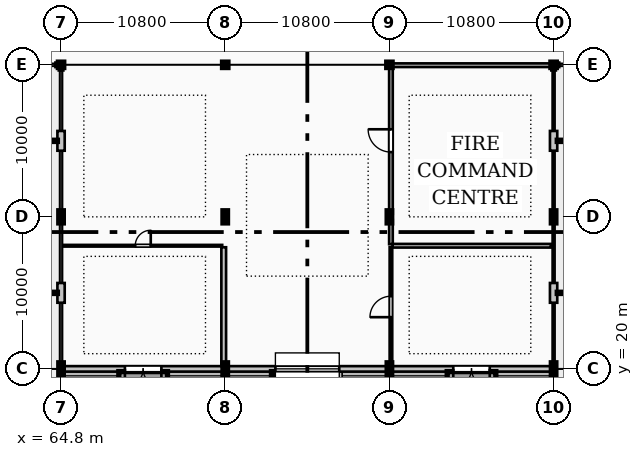
"""IFC4 building model, lengths in metres.
Left out: names, types, materials, properties, quantities, classifications, styles, units other than length and angle.
Written with IfcOpenShell. Run it as: python <this file> out.ifc"""

import sys

from ifc_helpers import new_model, si_unit, direction, frame, frame_2d, origin, origin_2d, place, context, subcontext, project, spatial, rectangle, hollow_circle, i_section, extrude, element, fill, save


model = new_model("IFC4")
c1 = context("Model", 3, precision=1e-05, world=origin(), true_north=direction((0.0, 1.0)))
c2 = subcontext(c1, "Body", "Model", "MODEL_VIEW")
j1 = project(units=[si_unit("LENGTHUNIT", "METRE"), si_unit("PLANEANGLEUNIT", "RADIAN")], contexts=[c1])
p1 = place(None, origin())
s1 = spatial("IfcSite", under=j1, at=p1, CompositionType="ELEMENT")
p2 = place(p1, origin())
s2 = spatial("IfcBuilding", under=s1, at=p2, CompositionType="ELEMENT")
p3 = place(p2, origin())
s3 = spatial("IfcBuildingStorey", under=s2, at=p3, CompositionType="ELEMENT", Elevation=0.0)
for number, where, z_axis, x_axis in (
    (1, (64.8, 20.0, 0.0), (0.0, 0.0, 1.0), (1.0, 0.0, 0.0)),
    (2, (64.8, 30.0, 0.0), (0.0, 0.0, 1.0), (1.0, 0.0, 0.0)),
):
    element("IfcColumn", number, at=place(p3, frame(where, z_axis=z_axis, x_axis=x_axis)), inside=s3, PredefinedType="COLUMN", context=c2, shape_type="SweptSolid", body=[
        extrude(i_section(OverallWidth=0.3, OverallDepth=0.8, WebThickness=0.018, FlangeThickness=0.033, FilletRadius=0.03, at=origin_2d()), origin(), (0.0, 0.0, 1.0), 4.8),
    ])
p4 = place(p3, frame((64.8, 40.0, 0.0), z_axis=(0.0, 0.0, 1.0), x_axis=(1.0, 0.0, 0.0)))
e3 = element("IfcColumn", 3, at=p4, inside=s3, PredefinedType="COLUMN", context=c2, shape_type="SweptSolid", body=[
    extrude(hollow_circle(Radius=0.178, WallThickness=0.016, at=origin_2d()), origin(), (0.0, 0.0, 1.0), 4.8),
])
for number, where, z_axis, x_axis in (
    (4, (75.6, 20.0, 0.0), (0.0, 0.0, 1.0), (1.0, 0.0, 0.0)),
    (5, (75.6, 30.0, 0.0), (0.0, 0.0, 1.0), (1.0, 0.0, 0.0)),
):
    element("IfcColumn", number, at=place(p3, frame(where, z_axis=z_axis, x_axis=x_axis)), inside=s3, PredefinedType="COLUMN", context=c2, shape_type="SweptSolid", body=[
        extrude(i_section(OverallWidth=0.3, OverallDepth=0.8, WebThickness=0.018, FlangeThickness=0.033, FilletRadius=0.03, at=origin_2d()), origin(), (0.0, 0.0, 1.0), 4.8),
    ])
p5 = place(p3, frame((75.6, 40.0, 0.0), z_axis=(0.0, 0.0, 1.0), x_axis=(1.0, 0.0, 0.0)))
e6 = element("IfcColumn", 6, at=p5, inside=s3, PredefinedType="COLUMN", context=c2, shape_type="SweptSolid", body=[
    extrude(hollow_circle(Radius=0.178, WallThickness=0.016, at=origin_2d()), origin(), (0.0, 0.0, 1.0), 4.8),
])
for number, where, z_axis, x_axis in (
    (7, (86.4, 20.0, 0.0), (0.0, 0.0, 1.0), (1.0, 0.0, 0.0)),
    (8, (86.4, 30.0, 0.0), (0.0, 0.0, 1.0), (1.0, 0.0, 0.0)),
):
    element("IfcColumn", number, at=place(p3, frame(where, z_axis=z_axis, x_axis=x_axis)), inside=s3, PredefinedType="COLUMN", context=c2, shape_type="SweptSolid", body=[
        extrude(i_section(OverallWidth=0.3, OverallDepth=0.8, WebThickness=0.018, FlangeThickness=0.033, FilletRadius=0.03, at=origin_2d()), origin(), (0.0, 0.0, 1.0), 4.8),
    ])
p6 = place(p3, frame((86.4, 40.0, 0.0), z_axis=(0.0, 0.0, 1.0), x_axis=(1.0, 0.0, 0.0)))
e9 = element("IfcColumn", 9, at=p6, inside=s3, PredefinedType="COLUMN", context=c2, shape_type="SweptSolid", body=[
    extrude(hollow_circle(Radius=0.178, WallThickness=0.016, at=origin_2d()), origin(), (0.0, 0.0, 1.0), 4.8),
])
for number, where, z_axis, x_axis in (
    (10, (97.2, 20.0, 0.0), (0.0, 0.0, 1.0), (1.0, 0.0, 0.0)),
    (11, (97.2, 30.0, 0.0), (0.0, 0.0, 1.0), (1.0, 0.0, 0.0)),
):
    element("IfcColumn", number, at=place(p3, frame(where, z_axis=z_axis, x_axis=x_axis)), inside=s3, PredefinedType="COLUMN", context=c2, shape_type="SweptSolid", body=[
        extrude(i_section(OverallWidth=0.3, OverallDepth=0.8, WebThickness=0.018, FlangeThickness=0.033, FilletRadius=0.03, at=origin_2d()), origin(), (0.0, 0.0, 1.0), 4.8),
    ])
p7 = place(p3, frame((97.2, 40.0, 0.0), z_axis=(0.0, 0.0, 1.0), x_axis=(1.0, 0.0, 0.0)))
e12 = element("IfcColumn", 12, at=p7, inside=s3, PredefinedType="COLUMN", context=c2, shape_type="SweptSolid", body=[
    extrude(hollow_circle(Radius=0.178, WallThickness=0.016, at=origin_2d()), origin(), (0.0, 0.0, 1.0), 4.8),
])
p8 = place(p3, frame((64.43, 40.0, 0.0), z_axis=(0.0, 0.0, 1.0), x_axis=(1.0, 0.0, 0.0)))
e13 = element("IfcWall", 13, at=p8, inside=s3, PredefinedType="STANDARD", context=c2, shape_type="SweptSolid", body=[
    extrude(rectangle(XDim=0.225, YDim=0.3, at=frame_2d((0.113, 0.0))), origin(), (0.0, 0.0, 1.0), 4.56),
])
p9 = place(p3, frame((64.8, 35.65, 0.0), z_axis=(0.0, 0.0, 1.0), x_axis=(0.0, -1.0, 0.0)))
e14 = element("IfcWall", 14, at=p9, inside=s3, PredefinedType="STANDARD", context=c2, shape_type="SweptSolid", body=[
    extrude(rectangle(XDim=1.3, YDim=0.48, at=frame_2d((0.65, 0.0))), origin(), (0.0, 0.0, 1.0), 4.56),
])
for number, where, z_axis, x_axis in (
    (15, (64.8, 39.855, 0.0), (0.0, 0.0, 1.0), (0.0, -1.0, 0.0)),
    (16, (64.8, 30.37, 0.0), (0.0, 0.0, 1.0), (0.0, -1.0, 0.0)),
):
    element("IfcWall", number, at=place(p3, frame(where, z_axis=z_axis, x_axis=x_axis)), inside=s3, PredefinedType="STANDARD", context=c2, shape_type="SweptSolid", body=[
        extrude(rectangle(XDim=0.225, YDim=0.3, at=frame_2d((0.113, 0.0))), origin(), (0.0, 0.0, 1.0), 4.56),
    ])
p10 = place(p3, frame((64.8, 25.65, 0.0), z_axis=(0.0, 0.0, 1.0), x_axis=(0.0, -1.0, 0.0)))
e17 = element("IfcWall", 17, at=p10, inside=s3, PredefinedType="STANDARD", context=c2, shape_type="SweptSolid", body=[
    extrude(rectangle(XDim=1.3, YDim=0.48, at=frame_2d((0.65, 0.0))), origin(), (0.0, 0.0, 1.0), 4.56),
])
for number, where, z_axis, x_axis in (
    (18, (64.8, 29.855, 0.0), (0.0, 0.0, 1.0), (0.0, -1.0, 0.0)),
    (19, (64.8, 20.37, 0.0), (0.0, 0.0, 1.0), (0.0, -1.0, 0.0)),
):
    element("IfcWall", number, at=place(p3, frame(where, z_axis=z_axis, x_axis=x_axis)), inside=s3, PredefinedType="STANDARD", context=c2, shape_type="SweptSolid", body=[
        extrude(rectangle(XDim=0.225, YDim=0.3, at=frame_2d((0.113, 0.0))), origin(), (0.0, 0.0, 1.0), 4.56),
    ])
p11 = place(p3, frame((64.945, 20.0, 0.0), z_axis=(0.0, 0.0, 1.0), x_axis=(1.0, 0.0, 0.0)))
e20 = element("IfcWall", 20, at=p11, inside=s3, PredefinedType="STANDARD", context=c2, shape_type="SweptSolid", body=[
    extrude(rectangle(XDim=10.51, YDim=0.36, at=frame_2d((5.255, 0.0))), origin(), (0.0, 0.0, 1.0), 4.36),
])
p12 = place(p11, frame((4.055, 0.0, 0.0)))
e21 = element("IfcOpeningElement", 21, at=p12, cuts=e20, PredefinedType="OPENING", context=c2, shape_type="SweptSolid", body=[
    extrude(rectangle(XDim=2.4, YDim=2.6, at=frame_2d((1.2, 1.3))), frame((0.0, 0.19, 0.0), z_axis=(0.0, -1.0, 0.0), x_axis=(1.0, 0.0, 0.0)), (0.0, 0.0, 1.0), 0.38),
])
p13 = place(p3, frame((75.745, 20.0, 0.0), z_axis=(0.0, 0.0, 1.0), x_axis=(1.0, 0.0, 0.0)))
e22 = element("IfcWall", 22, at=p13, inside=s3, PredefinedType="STANDARD", context=c2, shape_type="SweptSolid", body=[
    extrude(rectangle(XDim=10.51, YDim=0.36, at=frame_2d((5.255, 0.0))), origin(), (0.0, 0.0, 1.0), 4.36),
])
p14 = place(p13, frame((3.155, 0.0, 0.9)))
e23 = element("IfcOpeningElement", 23, at=p14, cuts=e22, PredefinedType="OPENING", context=c2, shape_type="SweptSolid", body=[
    extrude(rectangle(XDim=4.2, YDim=2.7, at=frame_2d((2.1, 1.35))), frame((0.0, 0.19, 0.0), z_axis=(0.0, -1.0, 0.0), x_axis=(1.0, 0.0, 0.0)), (0.0, 0.0, 1.0), 0.38),
])
p15 = place(p3, frame((86.545, 20.0, 0.0), z_axis=(0.0, 0.0, 1.0), x_axis=(1.0, 0.0, 0.0)))
e24 = element("IfcWall", 24, at=p15, inside=s3, PredefinedType="STANDARD", context=c2, shape_type="SweptSolid", body=[
    extrude(rectangle(XDim=10.51, YDim=0.36, at=frame_2d((5.255, 0.0))), origin(), (0.0, 0.0, 1.0), 4.36),
])
p16 = place(p15, frame((4.055, 0.0, 0.0)))
e25 = element("IfcOpeningElement", 25, at=p16, cuts=e24, PredefinedType="OPENING", context=c2, shape_type="SweptSolid", body=[
    extrude(rectangle(XDim=2.4, YDim=2.6, at=frame_2d((1.2, 1.3))), frame((0.0, 0.19, 0.0), z_axis=(0.0, -1.0, 0.0), x_axis=(1.0, 0.0, 0.0)), (0.0, 0.0, 1.0), 0.38),
])
p17 = place(p3, frame((97.2, 24.35, 0.0), z_axis=(0.0, 0.0, 1.0), x_axis=(0.0, 1.0, 0.0)))
e26 = element("IfcWall", 26, at=p17, inside=s3, PredefinedType="STANDARD", context=c2, shape_type="SweptSolid", body=[
    extrude(rectangle(XDim=1.3, YDim=0.48, at=frame_2d((0.65, 0.0))), origin(), (0.0, 0.0, 1.0), 4.56),
])
for number, where, z_axis, x_axis in (
    (27, (97.2, 20.145, 0.0), (0.0, 0.0, 1.0), (0.0, 1.0, 0.0)),
    (28, (97.2, 29.63, 0.0), (0.0, 0.0, 1.0), (0.0, 1.0, 0.0)),
):
    element("IfcWall", number, at=place(p3, frame(where, z_axis=z_axis, x_axis=x_axis)), inside=s3, PredefinedType="STANDARD", context=c2, shape_type="SweptSolid", body=[
        extrude(rectangle(XDim=0.225, YDim=0.3, at=frame_2d((0.113, 0.0))), origin(), (0.0, 0.0, 1.0), 4.56),
    ])
p18 = place(p3, frame((97.2, 34.35, 0.0), z_axis=(0.0, 0.0, 1.0), x_axis=(0.0, 1.0, 0.0)))
e29 = element("IfcWall", 29, at=p18, inside=s3, PredefinedType="STANDARD", context=c2, shape_type="SweptSolid", body=[
    extrude(rectangle(XDim=1.3, YDim=0.48, at=frame_2d((0.65, 0.0))), origin(), (0.0, 0.0, 1.0), 4.56),
])
for number, where, z_axis, x_axis in (
    (30, (97.2, 30.145, 0.0), (0.0, 0.0, 1.0), (0.0, 1.0, 0.0)),
    (31, (97.2, 39.63, 0.0), (0.0, 0.0, 1.0), (0.0, 1.0, 0.0)),
    (32, (97.345, 40.0, 0.0), (0.0, 0.0, 1.0), (1.0, 0.0, 0.0)),
):
    element("IfcWall", number, at=place(p3, frame(where, z_axis=z_axis, x_axis=x_axis)), inside=s3, PredefinedType="STANDARD", context=c2, shape_type="SweptSolid", body=[
        extrude(rectangle(XDim=0.225, YDim=0.3, at=frame_2d((0.113, 0.0))), origin(), (0.0, 0.0, 1.0), 4.56),
    ])
p19 = place(p3, frame((64.98, 28.1, 0.0), z_axis=(0.0, 0.0, 1.0), x_axis=(1.0, 0.0, 0.0)))
e33 = element("IfcWall", 33, at=p19, inside=s3, PredefinedType="PARTITIONING", context=c2, shape_type="SweptSolid", body=[
    extrude(rectangle(XDim=10.42, YDim=0.11, at=frame_2d((5.21, 0.0))), origin(), (0.0, 0.0, 1.0), 4.52),
])
p20 = place(p19, frame((4.7, 0.0, 0.0)))
e34 = element("IfcOpeningElement", 34, at=p20, cuts=e33, PredefinedType="OPENING", context=c2, shape_type="SweptSolid", body=[
    extrude(rectangle(XDim=1.02, YDim=2.1, at=frame_2d((0.51, 1.05))), frame((0.0, 0.065, 0.0), z_axis=(0.0, -1.0, 0.0), x_axis=(1.0, 0.0, 0.0)), (0.0, 0.0, 1.0), 0.13),
])
p21 = place(p3, frame((86.5, 20.18, 0.0), z_axis=(0.0, 0.0, 1.0), x_axis=(0.0, 1.0, 0.0)))
e35 = element("IfcWall", 35, at=p21, inside=s3, PredefinedType="PARTITIONING", context=c2, shape_type="SweptSolid", body=[
    extrude(rectangle(XDim=7.82, YDim=0.17, at=frame_2d((3.91, 0.0))), origin(), (0.0, 0.0, 1.0), 4.52),
])
p22 = place(p21, frame((3.22, 0.0, 0.0)))
e36 = element("IfcOpeningElement", 36, at=p22, cuts=e35, PredefinedType="OPENING", context=c2, shape_type="SweptSolid", body=[
    extrude(rectangle(XDim=1.38, YDim=2.38, at=frame_2d((0.69, 1.19))), frame((0.0, 0.095, 0.0), z_axis=(0.0, -1.0, 0.0), x_axis=(1.0, 0.0, 0.0)), (0.0, 0.0, 1.0), 0.19),
])
p23 = place(p3, frame((86.5, 28.2, 0.0), z_axis=(0.0, 0.0, 1.0), x_axis=(0.0, 1.0, 0.0)))
e37 = element("IfcWall", 37, at=p23, inside=s3, PredefinedType="SOLIDWALL", context=c2, shape_type="SweptSolid", body=[
    extrude(rectangle(XDim=1.6, YDim=0.24, at=frame_2d((0.8, 0.0))), origin(), (0.0, 0.0, 1.0), 4.52),
])
p24 = place(p3, frame((86.5, 30.2, 0.0), z_axis=(0.0, 0.0, 1.0), x_axis=(0.0, 1.0, 0.0)))
e38 = element("IfcWall", 38, at=p24, inside=s3, PredefinedType="SOLIDWALL", context=c2, shape_type="SweptSolid", body=[
    extrude(rectangle(XDim=9.62, YDim=0.24, at=frame_2d((4.81, 0.0))), origin(), (0.0, 0.0, 1.0), 4.52),
])
p25 = place(p24, frame((4.06, 0.0, 0.0)))
e39 = element("IfcOpeningElement", 39, at=p25, cuts=e38, PredefinedType="OPENING", context=c2, shape_type="SweptSolid", body=[
    extrude(rectangle(XDim=1.5, YDim=2.3, at=frame_2d((0.75, 1.15))), frame((0.0, 0.13, 0.0), z_axis=(0.0, -1.0, 0.0), x_axis=(1.0, 0.0, 0.0)), (0.0, 0.0, 1.0), 0.26),
])
p26 = place(p3, frame((86.6, 28.1, 0.0), z_axis=(0.0, 0.0, 1.0), x_axis=(1.0, 0.0, 0.0)))
e40 = element("IfcWall", 40, at=p26, inside=s3, PredefinedType="SOLIDWALL", context=c2, shape_type="SweptSolid", body=[
    extrude(rectangle(XDim=10.42, YDim=0.24, at=frame_2d((5.21, 0.0))), origin(), (0.0, 0.0, 1.0), 4.52),
])
p27 = place(p3, frame((86.6, 39.975, 0.0), z_axis=(0.0, 0.0, 1.0), x_axis=(1.0, 0.0, 0.0)))
e41 = element("IfcWall", 41, at=p27, inside=s3, PredefinedType="SOLIDWALL", context=c2, shape_type="SweptSolid", body=[
    extrude(rectangle(XDim=10.42, YDim=0.24, at=frame_2d((5.21, 0.0))), origin(), (0.0, 0.0, 1.0), 4.009),
])
p28 = place(p3, frame((75.5, 20.18, 0.0), z_axis=(0.0, 0.0, 1.0), x_axis=(0.0, 1.0, 0.0)))
e42 = element("IfcWall", 42, at=p28, inside=s3, PredefinedType="PARTITIONING", context=c2, shape_type="SweptSolid", body=[
    extrude(rectangle(XDim=7.82, YDim=0.31, at=frame_2d((3.91, 0.0))), origin(), (0.0, 0.0, 1.0), 4.52),
])
p29 = place(p12, frame((2.4, 0.0, 0.0), z_axis=(0.0, 0.0, 1.0), x_axis=(-1.0, 0.0, 0.0)))
e43 = element("IfcDoor", 43, at=p29, inside=s3, OperationType="DOUBLE_DOOR_SINGLE_SWING", PredefinedType="DOOR", context=c2, shape_type="SweptSolid", body=[
    extrude(rectangle(XDim=2.4, YDim=2.6, at=frame_2d((1.2, 1.3))), frame((0.0, 0.025, 0.0), z_axis=(0.0, -1.0, 0.0), x_axis=(1.0, 0.0, 0.0)), (0.0, 0.0, 1.0), 0.05),
])
fill(e21, e43)
p30 = place(p14, origin())
e44 = element("IfcWindow", 44, at=p30, inside=s3, PartitioningType="SINGLE_PANEL", PredefinedType="WINDOW", context=c2, shape_type="SweptSolid", body=[
    extrude(rectangle(XDim=4.2, YDim=2.7, at=frame_2d((2.1, 1.35))), frame((0.0, 0.03, 0.0), z_axis=(0.0, -1.0, 0.0), x_axis=(1.0, 0.0, 0.0)), (0.0, 0.0, 1.0), 0.06),
])
fill(e23, e44)
p31 = place(p16, frame((2.4, 0.0, 0.0), z_axis=(0.0, 0.0, 1.0), x_axis=(-1.0, 0.0, 0.0)))
e45 = element("IfcDoor", 45, at=p31, inside=s3, OperationType="DOUBLE_DOOR_SINGLE_SWING", PredefinedType="DOOR", context=c2, shape_type="SweptSolid", body=[
    extrude(rectangle(XDim=2.4, YDim=2.6, at=frame_2d((1.2, 1.3))), frame((0.0, 0.025, 0.0), z_axis=(0.0, -1.0, 0.0), x_axis=(1.0, 0.0, 0.0)), (0.0, 0.0, 1.0), 0.05),
])
fill(e25, e45)
p32 = place(p20, origin())
e46 = element("IfcDoor", 46, at=p32, inside=s3, OperationType="SINGLE_SWING_RIGHT", PredefinedType="DOOR", context=c2, shape_type="SweptSolid", body=[
    extrude(rectangle(XDim=1.02, YDim=2.1, at=frame_2d((0.51, 1.05))), frame((0.0, 0.025, 0.0), z_axis=(0.0, -1.0, 0.0), x_axis=(1.0, 0.0, 0.0)), (0.0, 0.0, 1.0), 0.05),
])
fill(e34, e46)
p33 = place(p22, origin())
e47 = element("IfcDoor", 47, at=p33, inside=s3, OperationType="SINGLE_SWING_LEFT", PredefinedType="DOOR", context=c2, shape_type="SweptSolid", body=[
    extrude(rectangle(XDim=1.38, YDim=2.38, at=frame_2d((0.69, 1.19))), frame((0.0, 0.025, 0.0), z_axis=(0.0, -1.0, 0.0), x_axis=(1.0, 0.0, 0.0)), (0.0, 0.0, 1.0), 0.05),
])
fill(e36, e47)
p34 = place(p25, origin())
e48 = element("IfcDoor", 48, at=p34, inside=s3, OperationType="SINGLE_SWING_RIGHT", PredefinedType="DOOR", context=c2, shape_type="SweptSolid", body=[
    extrude(rectangle(XDim=1.5, YDim=2.3, at=frame_2d((0.75, 1.15))), frame((0.0, 0.025, 0.0), z_axis=(0.0, -1.0, 0.0), x_axis=(1.0, 0.0, 0.0)), (0.0, 0.0, 1.0), 0.05),
])
fill(e39, e48)
save(model, sys.argv[1])
